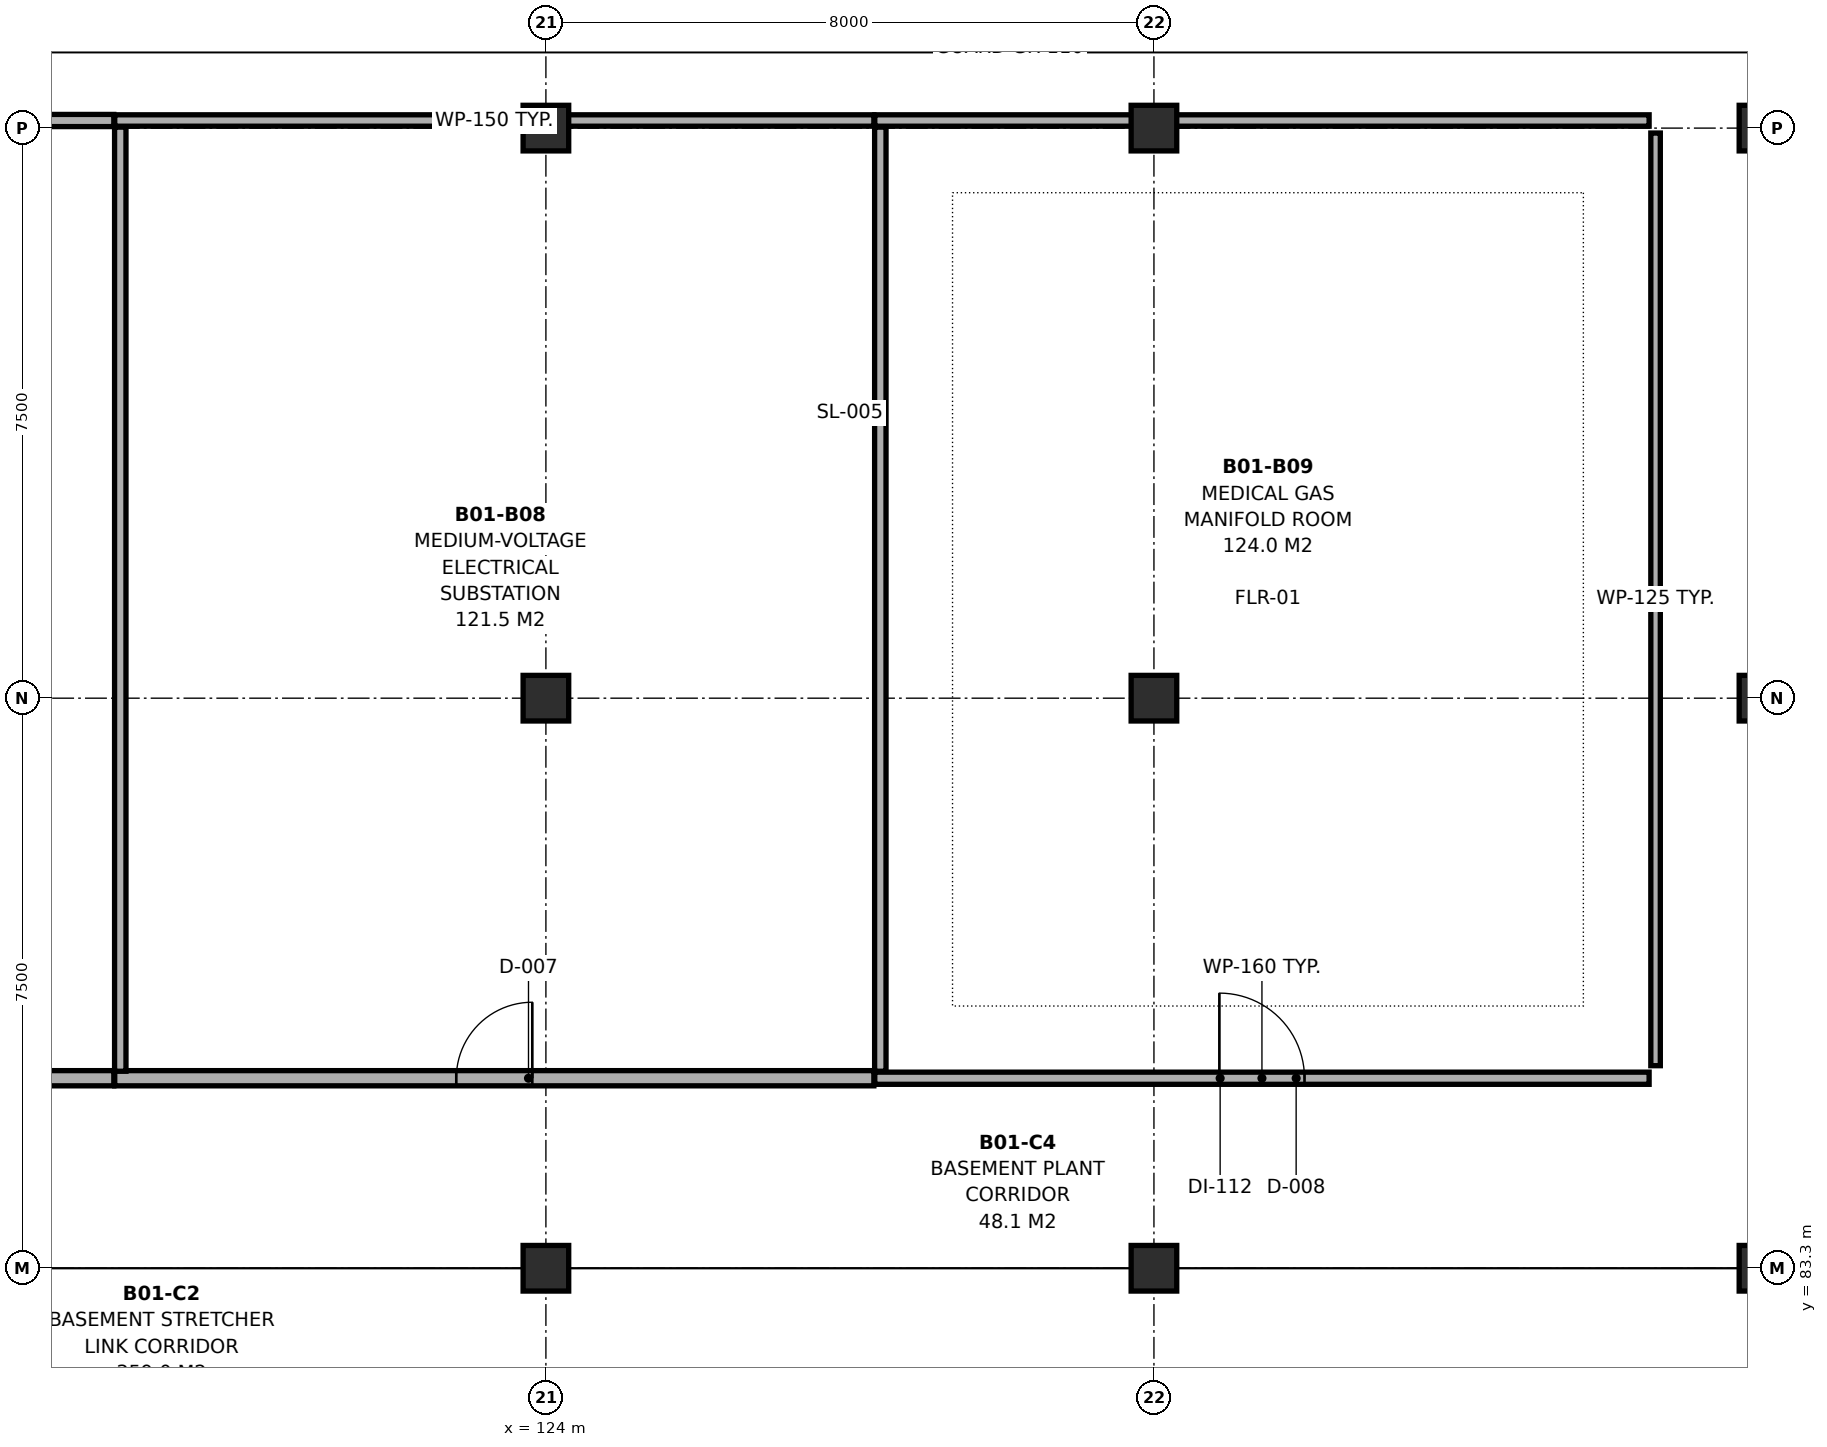
"""IFC4 building model, lengths in metres.
Left out: names, types, materials, properties, quantities, classifications, styles, units other than length and angle.
Written with IfcOpenShell. Run it as: python <this file> out.ifc"""

import sys

from ifc_helpers import new_model, si_unit, direction, frame, frame_2d, origin, origin_2d, place, context, subcontext, project, spatial, rectangle, extrude, element, fill, save


model = new_model("IFC4")
c1 = context("Model", 3, precision=1e-05, world=origin(), true_north=direction((0.0, 1.0)))
c2 = subcontext(c1, "Body", "Model", "MODEL_VIEW")
j1 = project(units=[si_unit("LENGTHUNIT", "METRE"), si_unit("PLANEANGLEUNIT", "RADIAN")], contexts=[c1])
p1 = place(None, origin())
s1 = spatial("IfcSite", under=j1, at=p1, CompositionType="ELEMENT")
p2 = place(p1, origin())
s2 = spatial("IfcBuilding", under=s1, at=p2, CompositionType="ELEMENT")
p3 = place(p2, frame((0.0, 0.0, -4.2)))
s3 = spatial("IfcBuildingStorey", under=s2, at=p3, CompositionType="ELEMENT", Elevation=-4.2)
for number, where, z_axis, x_axis in (
    (1, (124.0, 83.3, 0.0), (0.0, 0.0, 1.0), (1.0, 0.0, 0.0)),
    (2, (124.0, 90.8, 0.0), (0.0, 0.0, 1.0), (1.0, 0.0, 0.0)),
    (3, (124.0, 98.3, 0.0), (0.0, 0.0, 1.0), (1.0, 0.0, 0.0)),
    (4, (132.0, 83.3, 0.0), (0.0, 0.0, 1.0), (1.0, 0.0, 0.0)),
    (5, (132.0, 90.8, 0.0), (0.0, 0.0, 1.0), (1.0, 0.0, 0.0)),
    (6, (132.0, 98.3, 0.0), (0.0, 0.0, 1.0), (1.0, 0.0, 0.0)),
    (7, (140.0, 83.3, 0.0), (0.0, 0.0, 1.0), (1.0, 0.0, 0.0)),
    (8, (140.0, 90.8, 0.0), (0.0, 0.0, 1.0), (1.0, 0.0, 0.0)),
    (9, (140.0, 98.3, 0.0), (0.0, 0.0, 1.0), (1.0, 0.0, 0.0)),
):
    element("IfcColumn", number, at=place(p3, frame(where, z_axis=z_axis, x_axis=x_axis)), inside=s3, PredefinedType="COLUMN", context=c2, shape_type="SweptSolid", body=[
        extrude(rectangle(XDim=0.6, YDim=0.6, at=origin_2d()), origin(), (0.0, 0.0, 1.0), 3.75),
    ])
p4 = place(p3, frame((108.485, 85.8, 0.0), z_axis=(0.0, 0.0, 1.0), x_axis=(1.0, 0.0, 0.0)))
e10 = element("IfcWall", 10, at=p4, inside=s3, PredefinedType="PARTITIONING", context=c2, shape_type="SweptSolid", body=[
    extrude(rectangle(XDim=9.83, YDim=0.2, at=frame_2d((4.915, 0.0))), origin(), (0.0, 0.0, 1.0), 3.035),
])
p5 = place(p4, frame((4.415, 0.0, 0.0)))
e11 = element("IfcOpeningElement", 11, at=p5, cuts=e10, PredefinedType="OPENING", context=c2, shape_type="SweptSolid", body=[
    extrude(rectangle(XDim=1.0, YDim=2.15, at=frame_2d((0.5, 1.075))), frame((0.0, 0.112, 0.0), z_axis=(0.0, -1.0, 0.0), x_axis=(1.0, 0.0, 0.0)), (0.0, 0.0, 1.0), 0.224),
])
p6 = place(p3, frame((118.327, 85.8, 0.0), z_axis=(0.0, 0.0, 1.0), x_axis=(1.0, 0.0, 0.0)))
e12 = element("IfcWall", 12, at=p6, inside=s3, PredefinedType="PARTITIONING", context=c2, shape_type="SweptSolid", body=[
    extrude(rectangle(XDim=9.988, YDim=0.2, at=frame_2d((4.994, 0.0))), origin(), (0.0, 0.0, 1.0), 3.035),
])
p7 = place(p6, frame((4.494, 0.0, 0.0)))
e13 = element("IfcOpeningElement", 13, at=p7, cuts=e12, PredefinedType="OPENING", context=c2, shape_type="SweptSolid", body=[
    extrude(rectangle(XDim=1.0, YDim=2.15, at=frame_2d((0.5, 1.075))), frame((0.0, 0.112, 0.0), z_axis=(0.0, -1.0, 0.0), x_axis=(1.0, 0.0, 0.0)), (0.0, 0.0, 1.0), 0.224),
])
p8 = place(p3, frame((128.327, 85.8, 0.0), z_axis=(0.0, 0.0, 1.0), x_axis=(1.0, 0.0, 0.0)))
e14 = element("IfcWall", 14, at=p8, inside=s3, PredefinedType="PARTITIONING", context=c2, shape_type="SweptSolid", body=[
    extrude(rectangle(XDim=10.188, YDim=0.16, at=frame_2d((5.094, 0.0))), origin(), (0.0, 0.0, 1.0), 3.035),
])
p9 = place(p8, frame((4.534, 0.0, 0.0)))
e15 = element("IfcOpeningElement", 15, at=p9, cuts=e14, PredefinedType="OPENING", context=c2, shape_type="SweptSolid", body=[
    extrude(rectangle(XDim=1.12, YDim=2.2, at=frame_2d((0.56, 1.1))), frame((0.0, 0.092, 0.0), z_axis=(0.0, -1.0, 0.0), x_axis=(1.0, 0.0, 0.0)), (0.0, 0.0, 1.0), 0.184),
])
p10 = place(p3, frame((108.312, 98.4, 0.0), z_axis=(0.0, 0.0, 1.0), x_axis=(1.0, 0.0, 0.0)))
e16 = element("IfcWall", 16, at=p10, inside=s3, PredefinedType="PARTITIONING", context=c2, shape_type="SweptSolid", body=[
    extrude(rectangle(XDim=10.003, YDim=0.16, at=frame_2d((5.001, 0.0))), origin(), (0.0, 0.0, 1.0), 2.935),
])
p11 = place(p3, frame((118.327, 98.4, 0.0), z_axis=(0.0, 0.0, 1.0), x_axis=(1.0, 0.0, 0.0)))
e17 = element("IfcWall", 17, at=p11, inside=s3, PredefinedType="PARTITIONING", context=c2, shape_type="SweptSolid", body=[
    extrude(rectangle(XDim=9.988, YDim=0.15, at=frame_2d((4.994, 0.0))), origin(), (0.0, 0.0, 1.0), 2.935),
])
p12 = place(p3, frame((128.327, 98.4, 0.0), z_axis=(0.0, 0.0, 1.0), x_axis=(1.0, 0.0, 0.0)))
e18 = element("IfcWall", 18, at=p12, inside=s3, PredefinedType="PARTITIONING", context=c2, shape_type="SweptSolid", body=[
    extrude(rectangle(XDim=10.188, YDim=0.15, at=frame_2d((5.094, 0.0))), origin(), (0.0, 0.0, 1.0), 2.935),
])
for number, where, z_axis, x_axis in (
    (19, (118.4, 85.892, 0.0), (0.0, 0.0, 1.0), (0.0, 1.0, 0.0)),
    (20, (128.4, 85.892, 0.0), (0.0, 0.0, 1.0), (0.0, 1.0, 0.0)),
):
    element("IfcWall", number, at=place(p3, frame(where, z_axis=z_axis, x_axis=x_axis)), inside=s3, PredefinedType="PARTITIONING", context=c2, shape_type="SweptSolid", body=[
        extrude(rectangle(XDim=12.421, YDim=0.15, at=frame_2d((6.21, 0.0))), origin(), (0.0, 0.0, 1.0), 2.935),
    ])
p13 = place(p3, frame((138.6, 85.965, 0.0), z_axis=(0.0, 0.0, 1.0), x_axis=(0.0, 1.0, 0.0)))
e21 = element("IfcWall", 21, at=p13, inside=s3, PredefinedType="PARTITIONING", context=c2, shape_type="SweptSolid", body=[
    extrude(rectangle(XDim=12.27, YDim=0.125, at=frame_2d((6.135, 0.0))), origin(), (0.0, 0.0, 1.0), 2.935),
])
p14 = place(p7, origin())
e22 = element("IfcDoor", 22, at=p14, inside=s3, OperationType="SINGLE_SWING_RIGHT", PredefinedType="DOOR", context=c2, shape_type="SweptSolid", body=[
    extrude(rectangle(XDim=1.0, YDim=2.15, at=frame_2d((0.5, 1.075))), frame((0.0, 0.025, 0.0), z_axis=(0.0, -1.0, 0.0), x_axis=(1.0, 0.0, 0.0)), (0.0, 0.0, 1.0), 0.05),
])
fill(e13, e22)
p15 = place(p9, origin())
e23 = element("IfcDoor", 23, at=p15, inside=s3, OperationType="SINGLE_SWING_LEFT", PredefinedType="DOOR", context=c2, shape_type="SweptSolid", body=[
    extrude(rectangle(XDim=1.12, YDim=2.2, at=frame_2d((0.56, 1.1))), frame((0.0, 0.025, 0.0), z_axis=(0.0, -1.0, 0.0), x_axis=(1.0, 0.0, 0.0)), (0.0, 0.0, 1.0), 0.05),
])
fill(e15, e23)
save(model, sys.argv[1])
